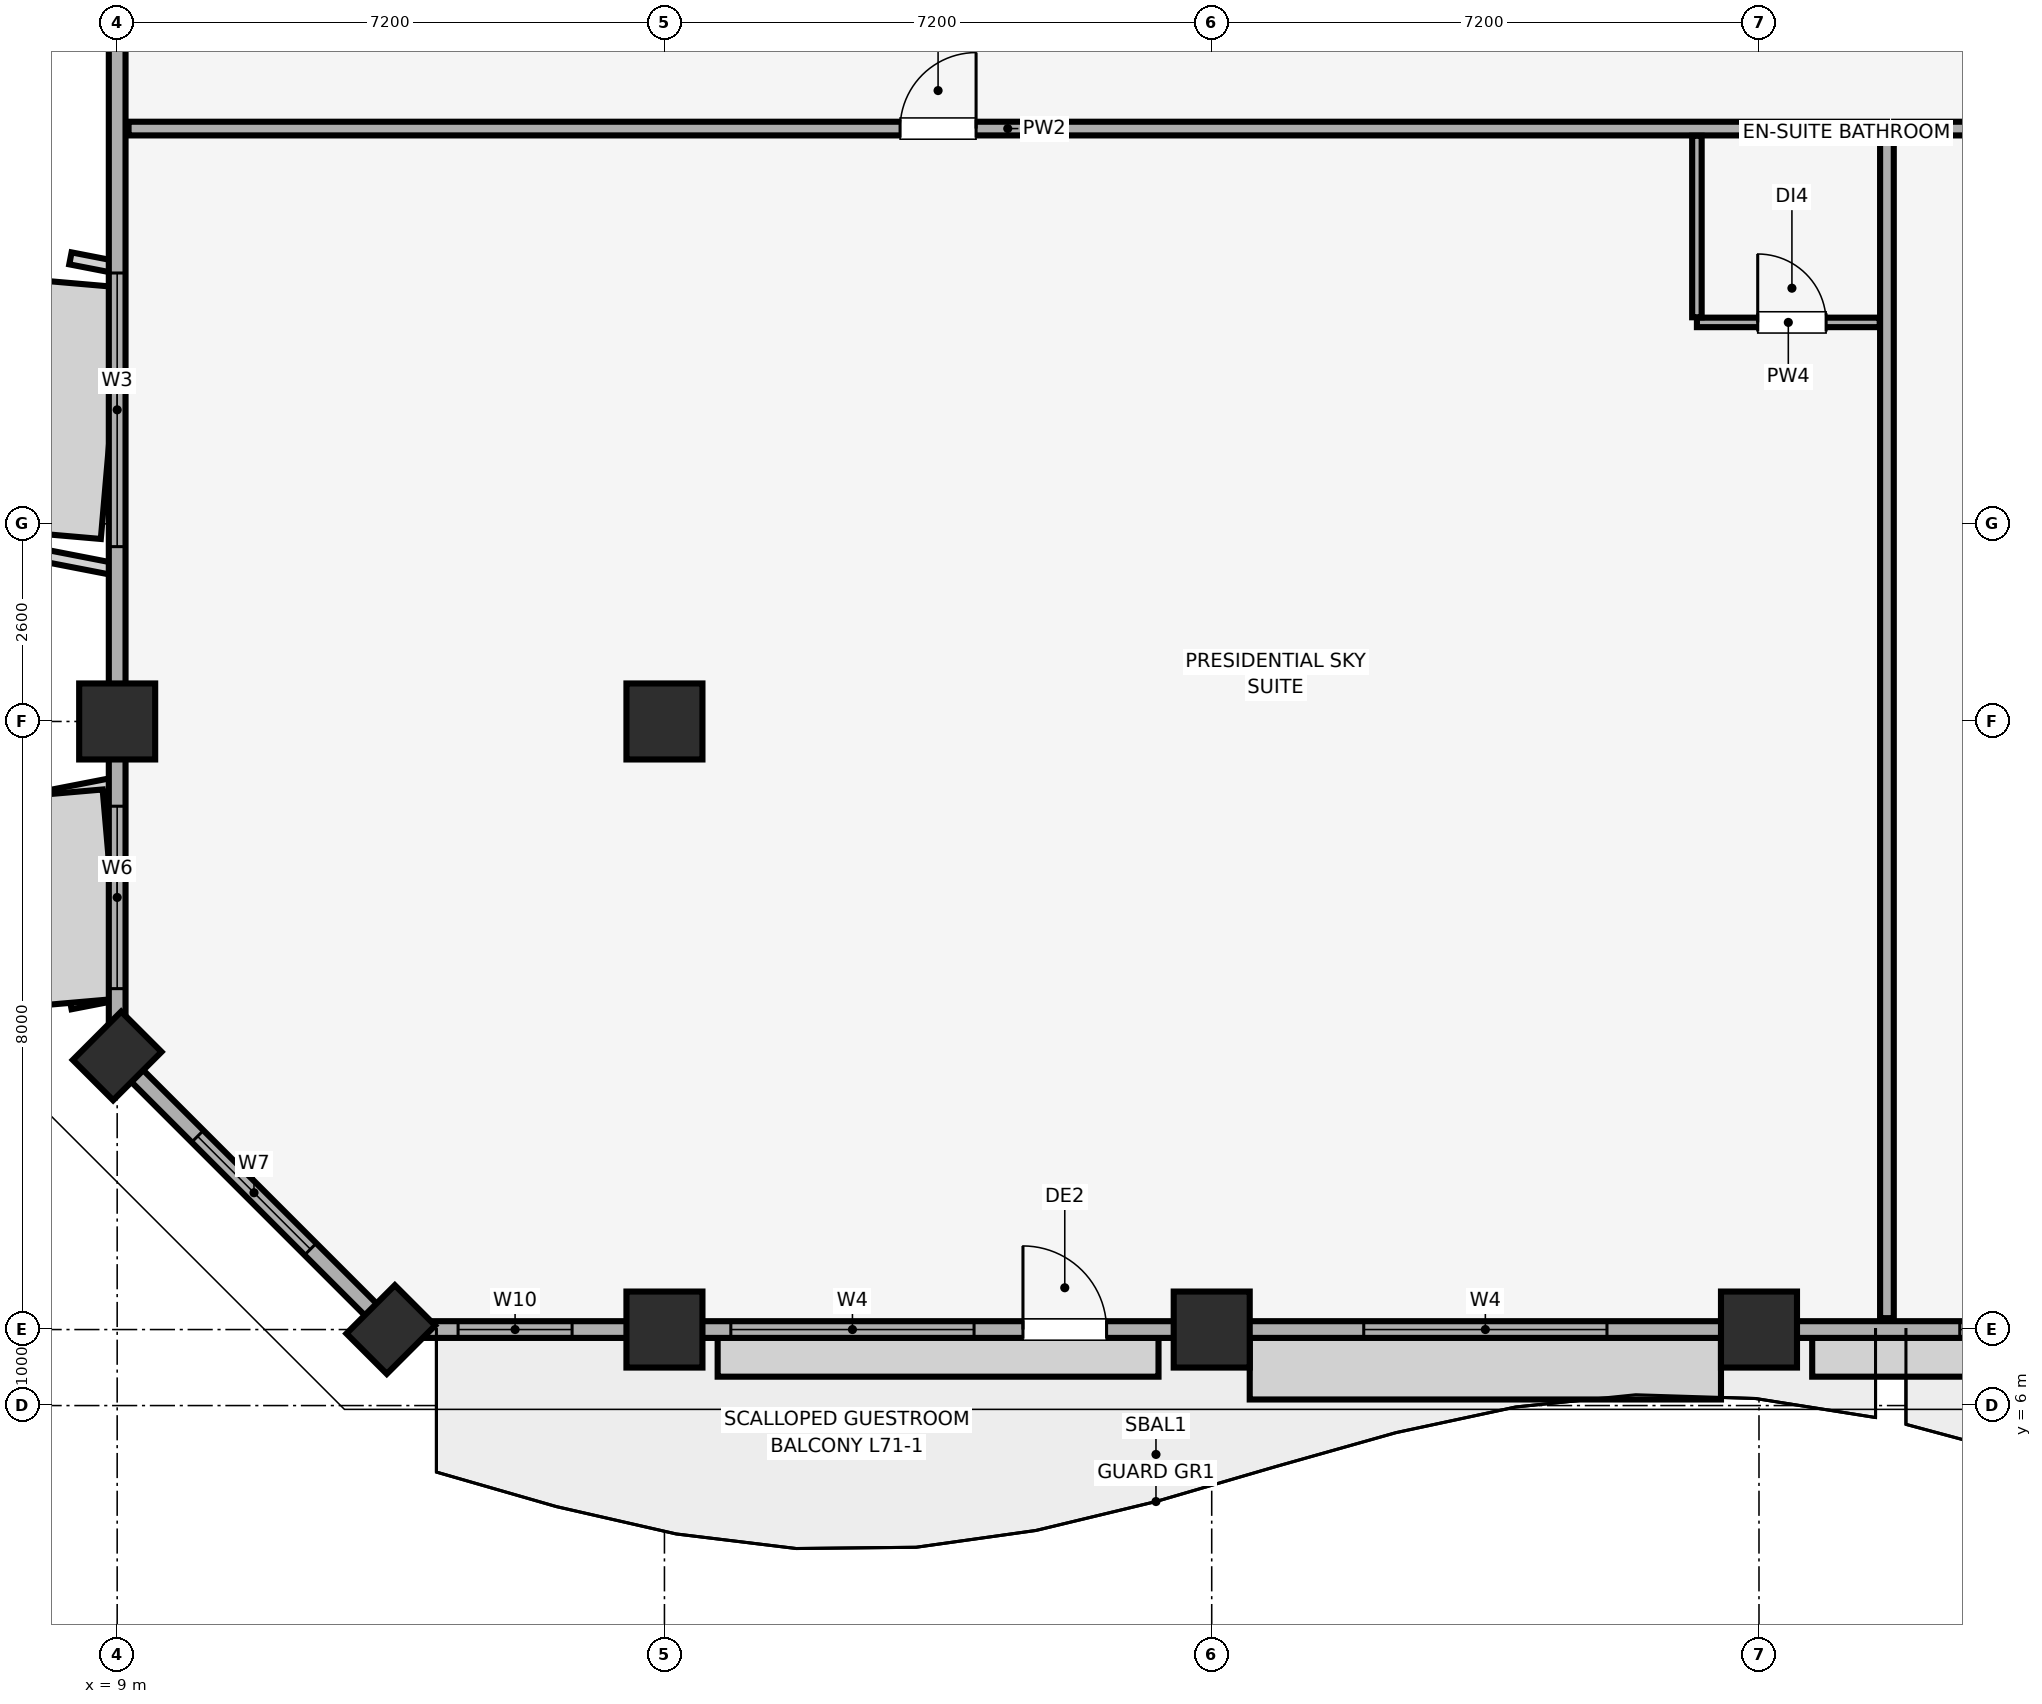
"""IFC4 building model, lengths in metres.
Left out: names, types, materials, properties, quantities, classifications, styles, units other than length and angle.
Written with IfcOpenShell. Run it as: python <this file> out.ifc"""

import sys

from ifc_helpers import new_model, si_unit, direction, frame, frame_2d, origin, origin_2d, place, context, subcontext, project, spatial, rectangle, extrude, element, fill, save


model = new_model("IFC4")
c1 = context("Model", 3, precision=1e-05, world=origin(), true_north=direction((0.0, 1.0)))
c2 = subcontext(c1, "Body", "Model", "MODEL_VIEW")
j1 = project(units=[si_unit("LENGTHUNIT", "METRE"), si_unit("PLANEANGLEUNIT", "RADIAN")], contexts=[c1])
p1 = place(None, origin())
s1 = spatial("IfcSite", under=j1, at=p1, CompositionType="ELEMENT")
p2 = place(p1, origin())
s2 = spatial("IfcBuilding", under=s1, at=p2, CompositionType="ELEMENT")
p3 = place(p2, frame((0.0, 0.0, 290.3)))
s3 = spatial("IfcBuildingStorey", under=s2, at=p3, CompositionType="ELEMENT", Elevation=290.3)
for number, where, z_axis, x_axis in (
    (1, (16.2, 7.0, 0.0), (0.0, 0.0, 1.0), (1.0, 0.0, 0.0)),
    (2, (23.4, 7.0, 0.0), (0.0, 0.0, 1.0), (1.0, 0.0, 0.0)),
    (3, (30.6, 7.0, 0.0), (0.0, 0.0, 1.0), (1.0, 0.0, 0.0)),
    (4, (9.0, 15.0, 0.0), (0.0, 0.0, 1.0), (1.0, 0.0, 0.0)),
):
    element("IfcColumn", number, at=place(p3, frame(where, z_axis=z_axis, x_axis=x_axis)), inside=s3, PredefinedType="COLUMN", context=c2, shape_type="SweptSolid", body=[
        extrude(rectangle(XDim=1.0, YDim=1.0, at=origin_2d()), origin(), (0.0, 0.0, 1.0), 4.02),
    ])
for number, where, z_axis, x_axis in (
    (5, (12.6, 7.0, 0.0), (0.0, 0.0, 1.0), (0.707, 0.707, 0.0)),
    (6, (9.0, 10.6, 0.0), (0.0, 0.0, 1.0), (0.707, 0.707, 0.0)),
):
    element("IfcColumn", number, at=place(p3, frame(where, z_axis=z_axis, x_axis=x_axis)), inside=s3, PredefinedType="PILASTER", context=c2, shape_type="SweptSolid", body=[
        extrude(rectangle(XDim=0.9, YDim=0.75, at=origin_2d()), origin(), (0.0, 0.0, 1.0), 4.02),
    ])
p4 = place(p3, frame((16.2, 15.0, 0.0), z_axis=(0.0, 0.0, 1.0), x_axis=(1.0, 0.0, 0.0)))
e7 = element("IfcColumn", 7, at=p4, inside=s3, PredefinedType="COLUMN", context=c2, shape_type="SweptSolid", body=[
    extrude(rectangle(XDim=1.0, YDim=1.0, at=origin_2d()), origin(), (0.0, 0.0, 1.0), 4.02),
])
p5 = place(p3, frame((12.6, 7.0, 0.0), z_axis=(0.0, 0.0, 1.0), x_axis=(1.0, 0.0, 0.0)))
e8 = element("IfcWall", 8, at=p5, inside=s3, PredefinedType="SOLIDWALL", context=c2, shape_type="SweptSolid", body=[
    extrude(rectangle(XDim=58.8, YDim=0.22, at=frame_2d((29.4, 0.0))), origin(), (0.0, 0.0, 1.0), 3.22),
])
p6 = place(p5, frame((8.317, 0.0, 0.0)))
e9 = element("IfcOpeningElement", 9, at=p6, cuts=e8, PredefinedType="OPENING", context=c2, shape_type="SweptSolid", body=[
    extrude(rectangle(XDim=1.1, YDim=2.15, at=frame_2d((0.55, 1.075))), frame((0.0, 0.12, 0.0), z_axis=(0.0, -1.0, 0.0), x_axis=(1.0, 0.0, 0.0)), (0.0, 0.0, 1.0), 0.24),
])
p7 = place(p5, frame((27.272, 0.0, 0.0)))
e10 = element("IfcOpeningElement", 10, at=p7, cuts=e8, PredefinedType="OPENING", context=c2, shape_type="SweptSolid", body=[
    extrude(rectangle(XDim=1.1, YDim=2.15, at=frame_2d((0.55, 1.075))), frame((0.0, 0.12, 0.0), z_axis=(0.0, -1.0, 0.0), x_axis=(1.0, 0.0, 0.0)), (0.0, 0.0, 1.0), 0.24),
])
p8 = place(p5, frame((49.383, 0.0, 0.0)))
e11 = element("IfcOpeningElement", 11, at=p8, cuts=e8, PredefinedType="OPENING", context=c2, shape_type="SweptSolid", body=[
    extrude(rectangle(XDim=1.1, YDim=2.15, at=frame_2d((0.55, 1.075))), frame((0.0, 0.12, 0.0), z_axis=(0.0, -1.0, 0.0), x_axis=(1.0, 0.0, 0.0)), (0.0, 0.0, 1.0), 0.24),
])
p9 = place(p5, frame((0.885, 0.0, 0.85)))
e12 = element("IfcOpeningElement", 12, at=p9, cuts=e8, PredefinedType="OPENING", context=c2, shape_type="SweptSolid", body=[
    extrude(rectangle(XDim=1.5, YDim=1.4, at=frame_2d((0.75, 0.7))), frame((0.0, 0.12, 0.0), z_axis=(0.0, -1.0, 0.0), x_axis=(1.0, 0.0, 0.0)), (0.0, 0.0, 1.0), 0.24),
])
p10 = place(p5, frame((4.473, 0.0, 0.85)))
e13 = element("IfcOpeningElement", 13, at=p10, cuts=e8, PredefinedType="OPENING", context=c2, shape_type="SweptSolid", body=[
    extrude(rectangle(XDim=3.2, YDim=1.85, at=frame_2d((1.6, 0.925))), frame((0.0, 0.12, 0.0), z_axis=(0.0, -1.0, 0.0), x_axis=(1.0, 0.0, 0.0)), (0.0, 0.0, 1.0), 0.24),
])
p11 = place(p5, frame((12.8, 0.0, 0.85)))
e14 = element("IfcOpeningElement", 14, at=p11, cuts=e8, PredefinedType="OPENING", context=c2, shape_type="SweptSolid", body=[
    extrude(rectangle(XDim=3.2, YDim=1.85, at=frame_2d((1.6, 0.925))), frame((0.0, 0.12, 0.0), z_axis=(0.0, -1.0, 0.0), x_axis=(1.0, 0.0, 0.0)), (0.0, 0.0, 1.0), 0.24),
])
p12 = place(p5, frame((20.642, 0.0, 0.85)))
e15 = element("IfcOpeningElement", 15, at=p12, cuts=e8, PredefinedType="OPENING", context=c2, shape_type="SweptSolid", body=[
    extrude(rectangle(XDim=3.2, YDim=1.85, at=frame_2d((1.6, 0.925))), frame((0.0, 0.12, 0.0), z_axis=(0.0, -1.0, 0.0), x_axis=(1.0, 0.0, 0.0)), (0.0, 0.0, 1.0), 0.24),
])
p13 = place(p5, frame((29.271, 0.0, 0.85)))
e16 = element("IfcOpeningElement", 16, at=p13, cuts=e8, PredefinedType="OPENING", context=c2, shape_type="SweptSolid", body=[
    extrude(rectangle(XDim=3.2, YDim=1.85, at=frame_2d((1.6, 0.925))), frame((0.0, 0.12, 0.0), z_axis=(0.0, -1.0, 0.0), x_axis=(1.0, 0.0, 0.0)), (0.0, 0.0, 1.0), 0.24),
])
p14 = place(p5, frame((34.958, 0.0, 0.85)))
e17 = element("IfcOpeningElement", 17, at=p14, cuts=e8, PredefinedType="OPENING", context=c2, shape_type="SweptSolid", body=[
    extrude(rectangle(XDim=3.2, YDim=1.85, at=frame_2d((1.6, 0.925))), frame((0.0, 0.12, 0.0), z_axis=(0.0, -1.0, 0.0), x_axis=(1.0, 0.0, 0.0)), (0.0, 0.0, 1.0), 0.24),
])
p15 = place(p5, frame((42.8, 0.0, 0.85)))
e18 = element("IfcOpeningElement", 18, at=p15, cuts=e8, PredefinedType="OPENING", context=c2, shape_type="SweptSolid", body=[
    extrude(rectangle(XDim=3.2, YDim=1.85, at=frame_2d((1.6, 0.925))), frame((0.0, 0.12, 0.0), z_axis=(0.0, -1.0, 0.0), x_axis=(1.0, 0.0, 0.0)), (0.0, 0.0, 1.0), 0.24),
])
p16 = place(p5, frame((51.127, 0.0, 0.85)))
e19 = element("IfcOpeningElement", 19, at=p16, cuts=e8, PredefinedType="OPENING", context=c2, shape_type="SweptSolid", body=[
    extrude(rectangle(XDim=3.2, YDim=1.85, at=frame_2d((1.6, 0.925))), frame((0.0, 0.12, 0.0), z_axis=(0.0, -1.0, 0.0), x_axis=(1.0, 0.0, 0.0)), (0.0, 0.0, 1.0), 0.24),
])
p17 = place(p5, frame((56.415, 0.0, 0.85)))
e20 = element("IfcOpeningElement", 20, at=p17, cuts=e8, PredefinedType="OPENING", context=c2, shape_type="SweptSolid", body=[
    extrude(rectangle(XDim=1.5, YDim=1.4, at=frame_2d((0.75, 0.7))), frame((0.0, 0.12, 0.0), z_axis=(0.0, -1.0, 0.0), x_axis=(1.0, 0.0, 0.0)), (0.0, 0.0, 1.0), 0.24),
])
p18 = place(p3, frame((9.0, 45.4, 0.0), z_axis=(0.0, 0.0, 1.0), x_axis=(0.0, -1.0, 0.0)))
e21 = element("IfcWall", 21, at=p18, inside=s3, PredefinedType="SOLIDWALL", context=c2, shape_type="SweptSolid", body=[
    extrude(rectangle(XDim=34.8, YDim=0.22, at=frame_2d((17.4, 0.0))), origin(), (0.0, 0.0, 1.0), 3.22),
])
p19 = place(p18, frame((31.515, 0.0, 0.85)))
e22 = element("IfcOpeningElement", 22, at=p19, cuts=e21, PredefinedType="OPENING", context=c2, shape_type="SweptSolid", body=[
    extrude(rectangle(XDim=2.4, YDim=1.5, at=frame_2d((1.2, 0.75))), frame((0.0, 0.12, 0.0), z_axis=(0.0, -1.0, 0.0), x_axis=(1.0, 0.0, 0.0)), (0.0, 0.0, 1.0), 0.24),
])
p20 = place(p18, frame((24.5, 0.0, 0.85)))
e23 = element("IfcOpeningElement", 23, at=p20, cuts=e21, PredefinedType="OPENING", context=c2, shape_type="SweptSolid", body=[
    extrude(rectangle(XDim=3.6, YDim=1.65, at=frame_2d((1.8, 0.825))), frame((0.0, 0.12, 0.0), z_axis=(0.0, -1.0, 0.0), x_axis=(1.0, 0.0, 0.0)), (0.0, 0.0, 1.0), 0.24),
])
p21 = place(p18, frame((17.3, 0.0, 0.85)))
e24 = element("IfcOpeningElement", 24, at=p21, cuts=e21, PredefinedType="OPENING", context=c2, shape_type="SweptSolid", body=[
    extrude(rectangle(XDim=2.4, YDim=1.5, at=frame_2d((1.2, 0.75))), frame((0.0, 0.12, 0.0), z_axis=(0.0, -1.0, 0.0), x_axis=(1.0, 0.0, 0.0)), (0.0, 0.0, 1.0), 0.24),
])
p22 = place(p18, frame((11.785, 0.0, 0.85)))
e25 = element("IfcOpeningElement", 25, at=p22, cuts=e21, PredefinedType="OPENING", context=c2, shape_type="SweptSolid", body=[
    extrude(rectangle(XDim=3.0, YDim=1.5, at=frame_2d((1.5, 0.75))), frame((0.0, 0.12, 0.0), z_axis=(0.0, -1.0, 0.0), x_axis=(1.0, 0.0, 0.0)), (0.0, 0.0, 1.0), 0.24),
])
p23 = place(p18, frame((7.015, 0.0, 0.85)))
e26 = element("IfcOpeningElement", 26, at=p23, cuts=e21, PredefinedType="OPENING", context=c2, shape_type="SweptSolid", body=[
    extrude(rectangle(XDim=3.0, YDim=1.5, at=frame_2d((1.5, 0.75))), frame((0.0, 0.12, 0.0), z_axis=(0.0, -1.0, 0.0), x_axis=(1.0, 0.0, 0.0)), (0.0, 0.0, 1.0), 0.24),
])
p24 = place(p18, frame((0.985, 0.0, 0.85)))
e27 = element("IfcOpeningElement", 27, at=p24, cuts=e21, PredefinedType="OPENING", context=c2, shape_type="SweptSolid", body=[
    extrude(rectangle(XDim=3.6, YDim=1.65, at=frame_2d((1.8, 0.825))), frame((0.0, 0.12, 0.0), z_axis=(0.0, -1.0, 0.0), x_axis=(1.0, 0.0, 0.0)), (0.0, 0.0, 1.0), 0.24),
])
p25 = place(p3, frame((9.0, 10.6, 0.0), z_axis=(0.0, 0.0, 1.0), x_axis=(0.707106781187, -0.707106781187, 0.0)))
e28 = element("IfcWall", 28, at=p25, inside=s3, PredefinedType="SOLIDWALL", context=c2, shape_type="SweptSolid", body=[
    extrude(rectangle(XDim=5.091, YDim=0.22, at=frame_2d((2.546, 0.0))), origin(), (0.0, 0.0, 1.0), 3.22),
])
p26 = place(p25, frame((1.496, 0.0, 0.85)))
e29 = element("IfcOpeningElement", 29, at=p26, cuts=e28, PredefinedType="OPENING", context=c2, shape_type="SweptSolid", body=[
    extrude(rectangle(XDim=2.1, YDim=1.6, at=frame_2d((1.05, 0.8))), frame((0.0, 0.12, 0.0), z_axis=(0.0, -1.0, 0.0), x_axis=(1.0, 0.0, 0.0)), (0.0, 0.0, 1.0), 0.24),
])
p27 = place(p3, frame((9.15, 22.8, 0.0), z_axis=(0.0, 0.0, 1.0), x_axis=(1.0, 0.0, 0.0)))
e30 = element("IfcWall", 30, at=p27, inside=s3, PredefinedType="PARTITIONING", context=c2, shape_type="SweptSolid", body=[
    extrude(rectangle(XDim=23.133, YDim=0.18, at=frame_2d((11.567, 0.0))), origin(), (0.0, 0.0, 1.0), 4.02),
])
p28 = place(p27, frame((10.15, 0.0, 0.0)))
e31 = element("IfcOpeningElement", 31, at=p28, cuts=e30, PredefinedType="OPENING", context=c2, shape_type="SweptSolid", body=[
    extrude(rectangle(XDim=1.0, YDim=2.15, at=frame_2d((0.5, 1.075))), frame((0.0, 0.1, 0.0), z_axis=(0.0, -1.0, 0.0), x_axis=(1.0, 0.0, 0.0)), (0.0, 0.0, 1.0), 0.2),
])
p29 = place(p3, frame((32.283, 7.15, 0.0), z_axis=(0.0, 0.0, 1.0), x_axis=(0.0, 1.0, 0.0)))
e32 = element("IfcWall", 32, at=p29, inside=s3, PredefinedType="PARTITIONING", context=c2, shape_type="SweptSolid", body=[
    extrude(rectangle(XDim=15.555, YDim=0.18, at=frame_2d((7.778, 0.0))), origin(), (0.0, 0.0, 1.0), 4.02),
])
p30 = place(p3, frame((29.783, 20.25, 0.0), z_axis=(0.0, 0.0, 1.0), x_axis=(1.0, 0.0, 0.0)))
e33 = element("IfcWall", 33, at=p30, inside=s3, PredefinedType="PARTITIONING", context=c2, shape_type="SweptSolid", body=[
    extrude(rectangle(XDim=2.405, YDim=0.125, at=frame_2d((1.203, 0.0))), origin(), (0.0, 0.0, 1.0), 4.02),
])
p31 = place(p30, frame((0.8, 0.0, 0.0)))
e34 = element("IfcOpeningElement", 34, at=p31, cuts=e33, PredefinedType="OPENING", context=c2, shape_type="SweptSolid", body=[
    extrude(rectangle(XDim=0.9, YDim=2.1, at=frame_2d((0.45, 1.05))), frame((0.0, 0.073, 0.0), z_axis=(0.0, -1.0, 0.0), x_axis=(1.0, 0.0, 0.0)), (0.0, 0.0, 1.0), 0.145),
])
p32 = place(p3, frame((29.783, 20.317, 0.0), z_axis=(0.0, 0.0, 1.0), x_axis=(0.0, 1.0, 0.0)))
e35 = element("IfcWall", 35, at=p32, inside=s3, PredefinedType="PARTITIONING", context=c2, shape_type="SweptSolid", body=[
    extrude(rectangle(XDim=2.388, YDim=0.125, at=frame_2d((1.194, 0.0))), origin(), (0.0, 0.0, 1.0), 4.02),
])
p33 = place(p3, frame((32.378, 22.8, 0.0), z_axis=(0.0, 0.0, 1.0), x_axis=(1.0, 0.0, 0.0)))
e36 = element("IfcWall", 36, at=p33, inside=s3, PredefinedType="PARTITIONING", context=c2, shape_type="SweptSolid", body=[
    extrude(rectangle(XDim=19.338, YDim=0.18, at=frame_2d((9.669, 0.0))), origin(), (0.0, 0.0, 1.0), 4.02),
])
p34 = place(p33, frame((9.122, 0.0, 0.0)))
e37 = element("IfcOpeningElement", 37, at=p34, cuts=e36, PredefinedType="OPENING", context=c2, shape_type="SweptSolid", body=[
    extrude(rectangle(XDim=1.0, YDim=2.15, at=frame_2d((0.5, 1.075))), frame((0.0, 0.1, 0.0), z_axis=(0.0, -1.0, 0.0), x_axis=(1.0, 0.0, 0.0)), (0.0, 0.0, 1.0), 0.2),
])
p35 = place(p26, origin())
e38 = element("IfcWindow", 38, at=p35, inside=s3, PartitioningType="SINGLE_PANEL", PredefinedType="WINDOW", context=c2, shape_type="SweptSolid", body=[
    extrude(rectangle(XDim=2.1, YDim=1.6, at=frame_2d((1.05, 0.8))), frame((0.0, 0.03, 0.0), z_axis=(0.0, -1.0, 0.0), x_axis=(1.0, 0.0, 0.0)), (0.0, 0.0, 1.0), 0.06),
])
fill(e29, e38)
p36 = place(p6, origin())
e39 = element("IfcDoor", 39, at=p36, inside=s3, OperationType="SINGLE_SWING_LEFT", PredefinedType="DOOR", context=c2, shape_type="SweptSolid", body=[
    extrude(rectangle(XDim=1.1, YDim=2.15, at=frame_2d((0.55, 1.075))), frame((0.0, 0.025, 0.0), z_axis=(0.0, -1.0, 0.0), x_axis=(1.0, 0.0, 0.0)), (0.0, 0.0, 1.0), 0.05),
])
fill(e9, e39)
p37 = place(p9, origin())
e40 = element("IfcWindow", 40, at=p37, inside=s3, PartitioningType="SINGLE_PANEL", PredefinedType="WINDOW", context=c2, shape_type="SweptSolid", body=[
    extrude(rectangle(XDim=1.5, YDim=1.4, at=frame_2d((0.75, 0.7))), frame((0.0, 0.03, 0.0), z_axis=(0.0, -1.0, 0.0), x_axis=(1.0, 0.0, 0.0)), (0.0, 0.0, 1.0), 0.06),
])
fill(e12, e40)
p38 = place(p10, origin())
e41 = element("IfcWindow", 41, at=p38, inside=s3, PartitioningType="SINGLE_PANEL", PredefinedType="WINDOW", context=c2, shape_type="SweptSolid", body=[
    extrude(rectangle(XDim=3.2, YDim=1.85, at=frame_2d((1.6, 0.925))), frame((0.0, 0.03, 0.0), z_axis=(0.0, -1.0, 0.0), x_axis=(1.0, 0.0, 0.0)), (0.0, 0.0, 1.0), 0.06),
])
fill(e13, e41)
p39 = place(p11, origin())
e42 = element("IfcWindow", 42, at=p39, inside=s3, PartitioningType="SINGLE_PANEL", PredefinedType="WINDOW", context=c2, shape_type="SweptSolid", body=[
    extrude(rectangle(XDim=3.2, YDim=1.85, at=frame_2d((1.6, 0.925))), frame((0.0, 0.03, 0.0), z_axis=(0.0, -1.0, 0.0), x_axis=(1.0, 0.0, 0.0)), (0.0, 0.0, 1.0), 0.06),
])
fill(e14, e42)
p40 = place(p12, origin())
e43 = element("IfcWindow", 43, at=p40, inside=s3, PartitioningType="SINGLE_PANEL", PredefinedType="WINDOW", context=c2, shape_type="SweptSolid", body=[
    extrude(rectangle(XDim=3.2, YDim=1.85, at=frame_2d((1.6, 0.925))), frame((0.0, 0.03, 0.0), z_axis=(0.0, -1.0, 0.0), x_axis=(1.0, 0.0, 0.0)), (0.0, 0.0, 1.0), 0.06),
])
fill(e15, e43)
p41 = place(p19, origin())
e44 = element("IfcWindow", 44, at=p41, inside=s3, PartitioningType="SINGLE_PANEL", PredefinedType="WINDOW", context=c2, shape_type="SweptSolid", body=[
    extrude(rectangle(XDim=2.4, YDim=1.5, at=frame_2d((1.2, 0.75))), frame((0.0, 0.03, 0.0), z_axis=(0.0, -1.0, 0.0), x_axis=(1.0, 0.0, 0.0)), (0.0, 0.0, 1.0), 0.06),
])
fill(e22, e44)
p42 = place(p20, origin())
e45 = element("IfcWindow", 45, at=p42, inside=s3, PartitioningType="SINGLE_PANEL", PredefinedType="WINDOW", context=c2, shape_type="SweptSolid", body=[
    extrude(rectangle(XDim=3.6, YDim=1.65, at=frame_2d((1.8, 0.825))), frame((0.0, 0.03, 0.0), z_axis=(0.0, -1.0, 0.0), x_axis=(1.0, 0.0, 0.0)), (0.0, 0.0, 1.0), 0.06),
])
fill(e23, e45)
p43 = place(p28, origin())
e46 = element("IfcDoor", 46, at=p43, inside=s3, OperationType="SINGLE_SWING_RIGHT", PredefinedType="DOOR", context=c2, shape_type="SweptSolid", body=[
    extrude(rectangle(XDim=1.0, YDim=2.15, at=frame_2d((0.5, 1.075))), frame((0.0, 0.025, 0.0), z_axis=(0.0, -1.0, 0.0), x_axis=(1.0, 0.0, 0.0)), (0.0, 0.0, 1.0), 0.05),
])
fill(e31, e46)
p44 = place(p31, origin())
e47 = element("IfcDoor", 47, at=p44, inside=s3, OperationType="SINGLE_SWING_LEFT", PredefinedType="DOOR", context=c2, shape_type="SweptSolid", body=[
    extrude(rectangle(XDim=0.9, YDim=2.1, at=frame_2d((0.45, 1.05))), frame((0.0, 0.025, 0.0), z_axis=(0.0, -1.0, 0.0), x_axis=(1.0, 0.0, 0.0)), (0.0, 0.0, 1.0), 0.05),
])
fill(e34, e47)
save(model, sys.argv[1])
